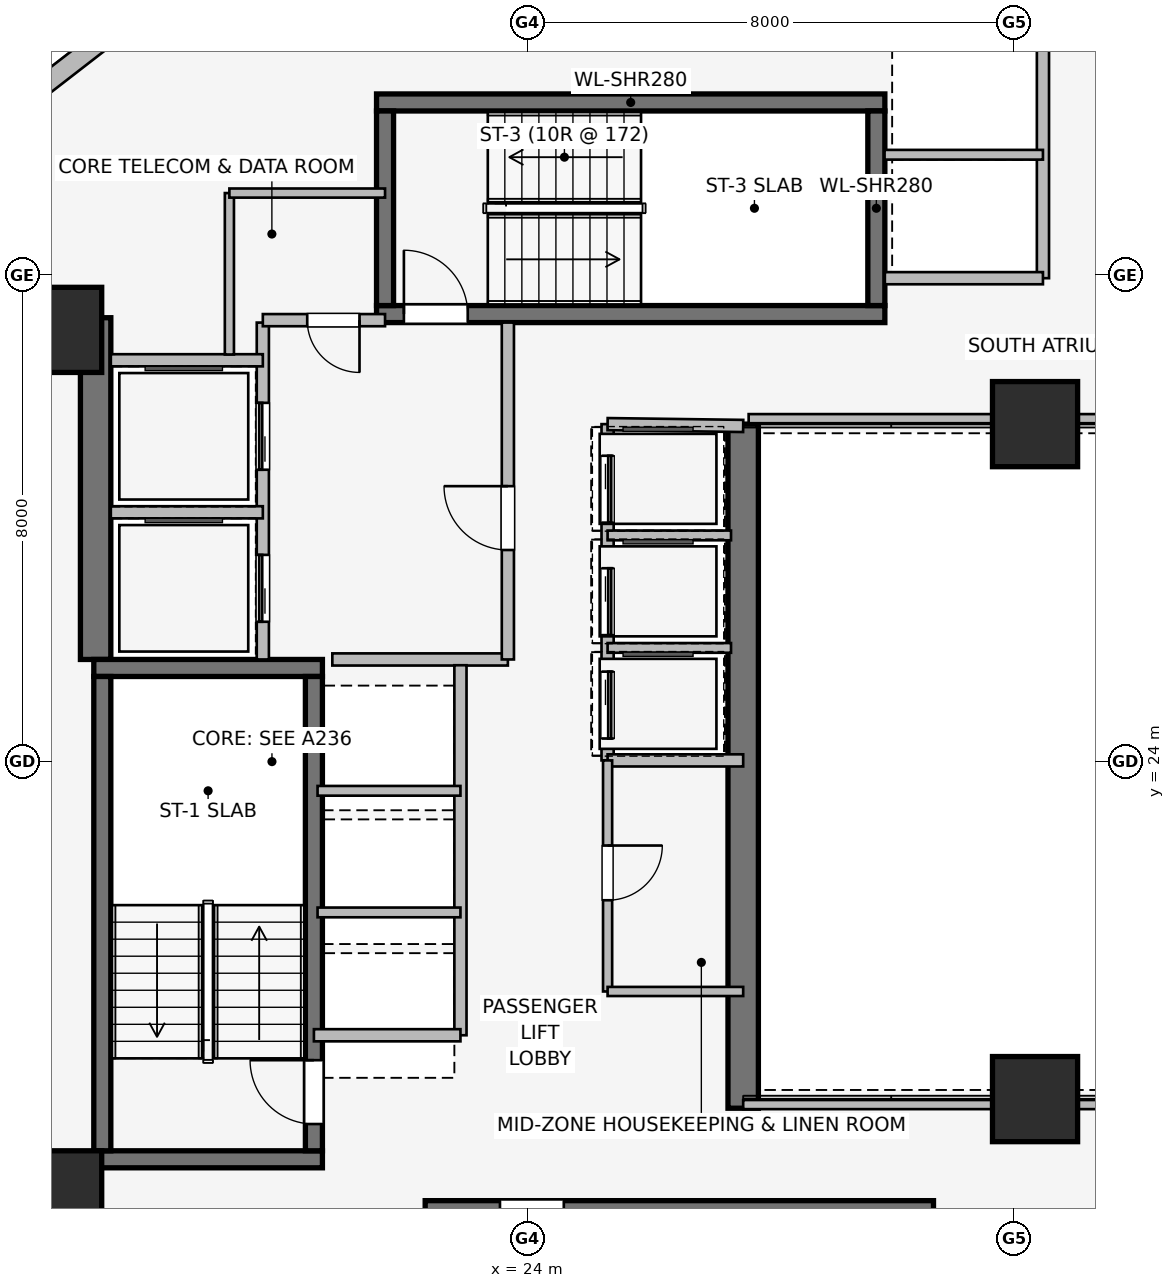
"""IFC4 building model, lengths in metres.
Left out: names, types, materials, properties, quantities, classifications, styles, units other than length and angle.
Written with IfcOpenShell. Run it as: python <this file> out.ifc"""

import sys

from ifc_helpers import new_model, si_unit, direction, frame, frame_2d, origin, origin_2d, place, context, subcontext, project, spatial, rectangle, extrude, element, fill, save


model = new_model("IFC4")
c1 = context("Model", 3, precision=1e-05, world=origin(), true_north=direction((0.0, 1.0)))
c2 = subcontext(c1, "Body", "Model", "MODEL_VIEW")
j1 = project(units=[si_unit("LENGTHUNIT", "METRE"), si_unit("PLANEANGLEUNIT", "RADIAN")], contexts=[c1])
p1 = place(None, origin())
s1 = spatial("IfcSite", under=j1, at=p1, CompositionType="ELEMENT")
p2 = place(p1, origin())
s2 = spatial("IfcBuilding", under=s1, at=p2, CompositionType="ELEMENT")
p3 = place(p2, frame((0.0, 0.0, 129.15)))
s3 = spatial("IfcBuildingStorey", under=s2, at=p3, CompositionType="ELEMENT", Elevation=129.15)
p4 = place(p3, frame((16.9, 25.68, 0.0), z_axis=(0.0, 0.0, 1.0), x_axis=(0.0, 1.0, 0.0)))
e1 = element("IfcWall", 1, at=p4, inside=s3, PredefinedType="SHEAR", context=c2, shape_type="SweptSolid", body=[
    extrude(rectangle(XDim=5.62, YDim=0.5, at=frame_2d((2.81, 0.0))), origin(), (0.0, 0.0, 1.0), 3.45),
])
p5 = place(p3, frame((27.55, 29.55, 0.0), z_axis=(0.0, 0.0, 1.0), x_axis=(0.0, -1.0, 0.0)))
e2 = element("IfcWall", 2, at=p5, inside=s3, PredefinedType="SHEAR", context=c2, shape_type="SweptSolid", body=[
    extrude(rectangle(XDim=11.25, YDim=0.5, at=frame_2d((5.625, 0.0))), origin(), (0.0, 0.0, 1.0), 3.45),
])
for number, where, z_axis, x_axis in (
    (3, (16.87, 17.46, 0.0), (0.0, 0.0, 1.0), (1.0, 0.0, 0.0)),
    (4, (20.63, 25.54, 0.0), (0.0, 0.0, 1.0), (-1.0, 0.0, 0.0)),
):
    element("IfcWall", number, at=place(p3, frame(where, z_axis=z_axis, x_axis=x_axis)), inside=s3, PredefinedType="SHEAR", context=c2, shape_type="SweptSolid", body=[
        extrude(rectangle(XDim=3.76, YDim=0.28, at=frame_2d((1.88, 0.0))), origin(), (0.0, 0.0, 1.0), 3.45),
    ])
p6 = place(p3, frame((17.01, 25.4, 0.0), z_axis=(0.0, 0.0, 1.0), x_axis=(0.0, -1.0, 0.0)))
e5 = element("IfcWall", 5, at=p6, inside=s3, PredefinedType="SHEAR", context=c2, shape_type="SweptSolid", body=[
    extrude(rectangle(XDim=7.8, YDim=0.28, at=frame_2d((3.9, 0.0))), origin(), (0.0, 0.0, 1.0), 3.45),
])
p7 = place(p3, frame((20.49, 17.6, 0.0), z_axis=(0.0, 0.0, 1.0), x_axis=(0.0, 1.0, 0.0)))
e6 = element("IfcWall", 6, at=p7, inside=s3, PredefinedType="SHEAR", context=c2, shape_type="SweptSolid", body=[
    extrude(rectangle(XDim=7.8, YDim=0.28, at=frame_2d((3.9, 0.0))), origin(), (0.0, 0.0, 1.0), 3.45),
])
p8 = place(p7, frame((0.44, 0.0, 0.0)))
e7 = element("IfcOpeningElement", 7, at=p8, cuts=e6, PredefinedType="OPENING", context=c2, shape_type="SweptSolid", body=[
    extrude(rectangle(XDim=1.05, YDim=2.0, at=frame_2d((0.525, 1.0))), frame((0.0, 0.15, 0.0), z_axis=(0.0, -1.0, 0.0), x_axis=(1.0, 0.0, 0.0)), (0.0, 0.0, 1.0), 0.3),
])
p9 = place(p3, frame((30.68, 16.64, 0.0), z_axis=(0.0, 0.0, 1.0), x_axis=(-1.0, 0.0, 0.0)))
e8 = element("IfcWall", 8, at=p9, inside=s3, PredefinedType="SHEAR", context=c2, shape_type="SweptSolid", body=[
    extrude(rectangle(XDim=8.36, YDim=0.28, at=frame_2d((4.18, 0.0))), origin(), (0.0, 0.0, 1.0), 3.45),
])
p10 = place(p9, frame((6.08, 0.0, 0.0)))
e9 = element("IfcOpeningElement", 9, at=p10, cuts=e8, PredefinedType="OPENING", context=c2, shape_type="SweptSolid", body=[
    extrude(rectangle(XDim=1.05, YDim=2.0, at=frame_2d((0.525, 1.0))), frame((0.0, 0.15, 0.0), z_axis=(0.0, -1.0, 0.0), x_axis=(1.0, 0.0, 0.0)), (0.0, 0.0, 1.0), 0.3),
])
p11 = place(p3, frame((21.52, 31.36, 0.0), z_axis=(0.0, 0.0, 1.0), x_axis=(1.0, 0.0, 0.0)))
e10 = element("IfcWall", 10, at=p11, inside=s3, PredefinedType="SHEAR", context=c2, shape_type="SweptSolid", body=[
    extrude(rectangle(XDim=8.36, YDim=0.28, at=frame_2d((4.18, 0.0))), origin(), (0.0, 0.0, 1.0), 3.45),
])
p12 = place(p11, frame((0.45, 0.0, 0.0)))
e11 = element("IfcOpeningElement", 11, at=p12, cuts=e10, PredefinedType="OPENING", context=c2, shape_type="SweptSolid", body=[
    extrude(rectangle(XDim=1.05, YDim=2.0, at=frame_2d((0.525, 1.0))), frame((0.0, 0.15, 0.0), z_axis=(0.0, -1.0, 0.0), x_axis=(1.0, 0.0, 0.0)), (0.0, 0.0, 1.0), 0.3),
])
p13 = place(p3, frame((29.88, 34.84, 0.0), z_axis=(0.0, 0.0, 1.0), x_axis=(-1.0, 0.0, 0.0)))
e12 = element("IfcWall", 12, at=p13, inside=s3, PredefinedType="SHEAR", context=c2, shape_type="SweptSolid", body=[
    extrude(rectangle(XDim=8.36, YDim=0.28, at=frame_2d((4.18, 0.0))), origin(), (0.0, 0.0, 1.0), 3.45),
])
for number, where, z_axis, x_axis in (
    (13, (21.66, 34.7, 0.0), (0.0, 0.0, 1.0), (0.0, -1.0, 0.0)),
    (14, (29.74, 31.5, 0.0), (0.0, 0.0, 1.0), (0.0, 1.0, 0.0)),
):
    element("IfcWall", number, at=place(p3, frame(where, z_axis=z_axis, x_axis=x_axis)), inside=s3, PredefinedType="SHEAR", context=c2, shape_type="SweptSolid", body=[
        extrude(rectangle(XDim=3.2, YDim=0.28, at=frame_2d((1.6, 0.0))), origin(), (0.0, 0.0, 1.0), 3.45),
    ])
for number, where, z_axis, x_axis in (
    (15, (16.3, 16.9, 0.0), (0.0, 0.0, 1.0), (1.0, 0.0, 0.0)),
    (16, (16.3, 31.1, 0.0), (0.0, 0.0, 1.0), (1.0, 0.0, 0.0)),
    (17, (32.35, 18.45, 0.0), (0.0, 0.0, 1.0), (1.0, 0.0, 0.0)),
    (18, (32.35, 29.55, 0.0), (0.0, 0.0, 1.0), (1.0, 0.0, 0.0)),
):
    element("IfcColumn", number, at=place(p3, frame(where, z_axis=z_axis, x_axis=x_axis)), inside=s3, PredefinedType="COLUMN", context=c2, shape_type="SweptSolid", body=[
        extrude(rectangle(XDim=1.4, YDim=1.4, at=origin_2d()), origin(), (0.0, 0.0, 1.0), 3.45),
    ])
p14 = place(p3, frame((15.918, 35.024, 0.0), z_axis=(0.0, 0.0, 1.0), x_axis=(0.790621329885, 0.612305408053, 0.0)))
e19 = element("IfcWall", 19, at=p14, inside=s3, PredefinedType="STANDARD", context=c2, shape_type="SweptSolid", body=[
    extrude(rectangle(XDim=1.676, YDim=0.33, at=frame_2d((0.838, 0.0))), origin(), (0.0, 0.0, 1.0), 3.19),
])
p15 = place(p3, frame((19.65, 25.68, 0.0), z_axis=(0.0, 0.0, 1.0), x_axis=(0.0, 1.0, 0.0)))
e20 = element("IfcWall", 20, at=p15, inside=s3, PredefinedType="PARTITIONING", context=c2, shape_type="SweptSolid", body=[
    extrude(rectangle(XDim=5.54, YDim=0.2, at=frame_2d((2.77, 0.0))), origin(), (0.0, 0.0, 1.0), 3.19),
])
p16 = place(p15, frame((0.62, 0.0, 0.0)))
e21 = element("IfcOpeningElement", 21, at=p16, cuts=e20, PredefinedType="OPENING", context=c2, shape_type="SweptSolid", body=[
    extrude(rectangle(XDim=1.1, YDim=2.2, at=frame_2d((0.55, 1.1))), frame((0.0, 0.11, 0.0), z_axis=(0.0, -1.0, 0.0), x_axis=(1.0, 0.0, 0.0)), (0.0, 0.0, 1.0), 0.22),
])
p17 = place(p15, frame((3.12, 0.0, 0.0)))
e22 = element("IfcOpeningElement", 22, at=p17, cuts=e20, PredefinedType="OPENING", context=c2, shape_type="SweptSolid", body=[
    extrude(rectangle(XDim=1.1, YDim=2.2, at=frame_2d((0.55, 1.1))), frame((0.0, 0.11, 0.0), z_axis=(0.0, -1.0, 0.0), x_axis=(1.0, 0.0, 0.0)), (0.0, 0.0, 1.0), 0.22),
])
p18 = place(p3, frame((20.793, 25.68, 0.0), z_axis=(0.0, 0.0, 1.0), x_axis=(1.0, 0.0, 0.0)))
e23 = element("IfcWall", 23, at=p18, inside=s3, PredefinedType="PARTITIONING", context=c2, shape_type="SweptSolid", body=[
    extrude(rectangle(XDim=2.887, YDim=0.2, at=frame_2d((1.443, 0.0))), origin(), (0.0, 0.0, 1.0), 3.19),
])
p19 = place(p3, frame((23.68, 25.68, 0.0), z_axis=(0.0, 0.0, 1.0), x_axis=(0.0, 1.0, 0.0)))
e24 = element("IfcWall", 24, at=p19, inside=s3, PredefinedType="PARTITIONING", context=c2, shape_type="SweptSolid", body=[
    extrude(rectangle(XDim=5.54, YDim=0.2, at=frame_2d((2.77, 0.0))), origin(), (0.0, 0.0, 1.0), 3.19),
])
p20 = place(p19, frame((1.8, 0.0, 0.0)))
e25 = element("IfcOpeningElement", 25, at=p20, cuts=e24, PredefinedType="OPENING", context=c2, shape_type="SweptSolid", body=[
    extrude(rectangle(XDim=1.05, YDim=2.0, at=frame_2d((0.525, 1.0))), frame((0.0, 0.11, 0.0), z_axis=(0.0, -1.0, 0.0), x_axis=(1.0, 0.0, 0.0)), (0.0, 0.0, 1.0), 0.22),
])
p21 = place(p3, frame((21.66, 31.26, 0.0), z_axis=(0.0, 0.0, 1.0), x_axis=(-1.0, 0.0, 0.0)))
e26 = element("IfcWall", 26, at=p21, inside=s3, PredefinedType="PARTITIONING", context=c2, shape_type="SweptSolid", body=[
    extrude(rectangle(XDim=2.01, YDim=0.2, at=frame_2d((1.005, 0.0))), origin(), (0.0, 0.0, 1.0), 3.19),
])
p22 = place(p21, frame((0.42, 0.0, 0.0)))
e27 = element("IfcOpeningElement", 27, at=p22, cuts=e26, PredefinedType="OPENING", context=c2, shape_type="SweptSolid", body=[
    extrude(rectangle(XDim=0.86, YDim=2.0, at=frame_2d((0.43, 1.0))), frame((0.0, 0.11, 0.0), z_axis=(0.0, -1.0, 0.0), x_axis=(1.0, 0.0, 0.0)), (0.0, 0.0, 1.0), 0.22),
])
p23 = place(p3, frame((17.15, 28.1, 0.0), z_axis=(0.0, 0.0, 1.0), x_axis=(1.0, 0.0, 0.0)))
e28 = element("IfcWall", 28, at=p23, inside=s3, PredefinedType="PARTITIONING", context=c2, shape_type="SweptSolid", body=[
    extrude(rectangle(XDim=2.5, YDim=0.2, at=frame_2d((1.25, 0.0))), origin(), (0.0, 0.0, 1.0), 3.19),
])
p24 = place(p3, frame((19.65, 30.6, 0.0), z_axis=(0.0, 0.0, 1.0), x_axis=(-1.0, 0.0, 0.0)))
e29 = element("IfcWall", 29, at=p24, inside=s3, PredefinedType="PARTITIONING", context=c2, shape_type="SweptSolid", body=[
    extrude(rectangle(XDim=2.5, YDim=0.2, at=frame_2d((1.25, 0.0))), origin(), (0.0, 0.0, 1.0), 2.09),
])
p25 = place(p3, frame((32.48, 31.95, 0.0), z_axis=(0.0, 0.0, 1.0), x_axis=(0.0, 1.0, 0.0)))
e30 = element("IfcWall", 30, at=p25, inside=s3, PredefinedType="PARTITIONING", context=c2, shape_type="SweptSolid", body=[
    extrude(rectangle(XDim=4.05, YDim=0.2, at=frame_2d((2.025, 0.0))), origin(), (0.0, 0.0, 1.0), 3.19),
])
p26 = place(p3, frame((32.48, 31.95, 0.0), z_axis=(0.0, 0.0, 1.0), x_axis=(-1.0, 0.0, 0.0)))
e31 = element("IfcWall", 31, at=p26, inside=s3, PredefinedType="PARTITIONING", context=c2, shape_type="SweptSolid", body=[
    extrude(rectangle(XDim=2.6, YDim=0.2, at=frame_2d((1.3, 0.0))), origin(), (0.0, 0.0, 1.0), 3.19),
])
p27 = place(p3, frame((29.875, 33.98, 0.0), z_axis=(0.0, 0.0, 1.0), x_axis=(1.0, 0.0, 0.0)))
e32 = element("IfcWall", 32, at=p27, inside=s3, PredefinedType="PARTITIONING", context=c2, shape_type="SweptSolid", body=[
    extrude(rectangle(XDim=2.605, YDim=0.16, at=frame_2d((1.302, 0.0))), origin(), (0.0, 0.0, 1.0), 3.19),
])
p28 = place(p3, frame((22.9, 19.5, 0.0), z_axis=(0.0, 0.0, 1.0), x_axis=(0.0, 1.0, 0.0)))
e33 = element("IfcWall", 33, at=p28, inside=s3, PredefinedType="PARTITIONING", context=c2, shape_type="SweptSolid", body=[
    extrude(rectangle(XDim=6.085, YDim=0.2, at=frame_2d((3.042, 0.0))), origin(), (0.0, 0.0, 1.0), 3.19),
])
p29 = place(p3, frame((20.49, 19.5, 0.0), z_axis=(0.0, 0.0, 1.0), x_axis=(1.0, 0.0, 0.0)))
e34 = element("IfcWall", 34, at=p29, inside=s3, PredefinedType="PARTITIONING", context=c2, shape_type="SweptSolid", body=[
    extrude(rectangle(XDim=2.41, YDim=0.2, at=frame_2d((1.205, 0.0))), origin(), (0.0, 0.0, 1.0), 2.09),
])
for number, where, z_axis, x_axis in (
    (35, (20.55, 21.52, 0.0), (0.0, 0.0, 1.0), (1.0, 0.0, 0.0)),
    (36, (20.55, 23.52, 0.0), (0.0, 0.0, 1.0), (1.0, 0.0, 0.0)),
):
    element("IfcWall", number, at=place(p3, frame(where, z_axis=z_axis, x_axis=x_axis)), inside=s3, PredefinedType="PARTITIONING", context=c2, shape_type="SweptSolid", body=[
        extrude(rectangle(XDim=2.35, YDim=0.16, at=frame_2d((1.175, 0.0))), origin(), (0.0, 0.0, 1.0), 3.19),
    ])
p30 = place(p3, frame((25.32, 29.55, 0.0), z_axis=(0.0, 0.0, 1.0), x_axis=(0.0, -1.0, 0.0)))
e37 = element("IfcWall", 37, at=p30, inside=s3, PredefinedType="PARTITIONING", context=c2, shape_type="SweptSolid", body=[
    extrude(rectangle(XDim=5.53, YDim=0.2, at=frame_2d((2.765, 0.0))), origin(), (0.0, 0.0, 1.0), 3.19),
])
p31 = place(p30, frame((0.52, 0.0, 0.0)))
e38 = element("IfcOpeningElement", 38, at=p31, cuts=e37, PredefinedType="OPENING", context=c2, shape_type="SweptSolid", body=[
    extrude(rectangle(XDim=1.1, YDim=2.2, at=frame_2d((0.55, 1.1))), frame((0.0, 0.11, 0.0), z_axis=(0.0, -1.0, 0.0), x_axis=(1.0, 0.0, 0.0)), (0.0, 0.0, 1.0), 0.22),
])
p32 = place(p30, frame((2.37, 0.0, 0.0)))
e39 = element("IfcOpeningElement", 39, at=p32, cuts=e37, PredefinedType="OPENING", context=c2, shape_type="SweptSolid", body=[
    extrude(rectangle(XDim=1.1, YDim=2.2, at=frame_2d((0.55, 1.1))), frame((0.0, 0.11, 0.0), z_axis=(0.0, -1.0, 0.0), x_axis=(1.0, 0.0, 0.0)), (0.0, 0.0, 1.0), 0.22),
])
p33 = place(p30, frame((4.07, 0.0, 0.0)))
e40 = element("IfcOpeningElement", 40, at=p33, cuts=e37, PredefinedType="OPENING", context=c2, shape_type="SweptSolid", body=[
    extrude(rectangle(XDim=1.1, YDim=2.2, at=frame_2d((0.55, 1.1))), frame((0.0, 0.11, 0.0), z_axis=(0.0, -1.0, 0.0), x_axis=(1.0, 0.0, 0.0)), (0.0, 0.0, 1.0), 0.22),
])
p34 = place(p3, frame((27.55, 29.52, 0.0), z_axis=(0.0, 0.0, 1.0), x_axis=(-0.999909343457, 0.013464949556, 0.0)))
e41 = element("IfcWall", 41, at=p34, inside=s3, PredefinedType="PARTITIONING", context=c2, shape_type="SweptSolid", body=[
    extrude(rectangle(XDim=2.23, YDim=0.2, at=frame_2d((1.115, 0.0))), origin(), (0.0, 0.0, 1.0), 2.09),
])
p35 = place(p3, frame((25.32, 24.02, 0.0), z_axis=(0.0, 0.0, 1.0), x_axis=(1.0, 0.0, 0.0)))
e42 = element("IfcWall", 42, at=p35, inside=s3, PredefinedType="PARTITIONING", context=c2, shape_type="SweptSolid", body=[
    extrude(rectangle(XDim=2.23, YDim=0.2, at=frame_2d((1.115, 0.0))), origin(), (0.0, 0.0, 1.0), 3.19),
])
for number, where, z_axis, x_axis in (
    (43, (25.32, 25.87, 0.0), (0.0, 0.0, 1.0), (1.0, 0.0, 0.0)),
    (44, (25.32, 27.72, 0.0), (0.0, 0.0, 1.0), (1.0, 0.0, 0.0)),
):
    element("IfcWall", number, at=place(p3, frame(where, z_axis=z_axis, x_axis=x_axis)), inside=s3, PredefinedType="PARTITIONING", context=c2, shape_type="SweptSolid", body=[
        extrude(rectangle(XDim=2.03, YDim=0.16, at=frame_2d((1.015, 0.0))), origin(), (0.0, 0.0, 1.0), 3.19),
    ])
p36 = place(p3, frame((25.32, 24.02, 0.0), z_axis=(0.0, 0.0, 1.0), x_axis=(0.0, -1.0, 0.0)))
e45 = element("IfcWall", 45, at=p36, inside=s3, PredefinedType="PARTITIONING", context=c2, shape_type="SweptSolid", body=[
    extrude(rectangle(XDim=3.8, YDim=0.15, at=frame_2d((1.9, 0.0))), origin(), (0.0, 0.0, 1.0), 3.19),
])
p37 = place(p36, frame((1.4, 0.0, 0.0)))
e46 = element("IfcOpeningElement", 46, at=p37, cuts=e45, PredefinedType="OPENING", context=c2, shape_type="SweptSolid", body=[
    extrude(rectangle(XDim=0.9, YDim=2.0, at=frame_2d((0.45, 1.0))), frame((0.0, 0.085, 0.0), z_axis=(0.0, -1.0, 0.0), x_axis=(1.0, 0.0, 0.0)), (0.0, 0.0, 1.0), 0.17),
])
p38 = place(p3, frame((25.32, 20.22, 0.0), z_axis=(0.0, 0.0, 1.0), x_axis=(1.0, 0.0, 0.0)))
e47 = element("IfcWall", 47, at=p38, inside=s3, PredefinedType="PARTITIONING", context=c2, shape_type="SweptSolid", body=[
    extrude(rectangle(XDim=2.23, YDim=0.15, at=frame_2d((1.115, 0.0))), origin(), (0.0, 0.0, 1.0), 3.19),
])
p39 = place(p3, frame((19.1, 33.35, 0.0), z_axis=(0.0, 0.0, 1.0), x_axis=(0.0, -1.0, 0.0)))
e48 = element("IfcWall", 48, at=p39, inside=s3, PredefinedType="PARTITIONING", context=c2, shape_type="SweptSolid", body=[
    extrude(rectangle(XDim=2.655, YDim=0.15, at=frame_2d((1.328, 0.0))), origin(), (0.0, 0.0, 1.0), 2.42),
])
p40 = place(p3, frame((21.66, 33.35, 0.0), z_axis=(0.0, 0.0, 1.0), x_axis=(-1.0, 0.0, 0.0)))
e49 = element("IfcWall", 49, at=p40, inside=s3, PredefinedType="PARTITIONING", context=c2, shape_type="SweptSolid", body=[
    extrude(rectangle(XDim=2.56, YDim=0.15, at=frame_2d((1.28, 0.0))), origin(), (0.0, 0.0, 1.0), 3.19),
])
p41 = place(p3, frame((27.55, 18.36, 0.0), z_axis=(0.0, 0.0, 1.0), x_axis=(1.0, 0.0, 0.0)))
e50 = element("IfcWall", 50, at=p41, inside=s3, PredefinedType="PARTITIONING", context=c2, shape_type="SweptSolid", body=[
    extrude(rectangle(XDim=12.29, YDim=0.15, at=frame_2d((6.145, 0.0))), origin(), (0.0, 0.0, 1.0), 2.331),
])
p42 = place(p3, frame((39.84, 29.64, 0.0), z_axis=(0.0, 0.0, 1.0), x_axis=(-1.0, 0.0, 0.0)))
e51 = element("IfcWall", 51, at=p42, inside=s3, PredefinedType="PARTITIONING", context=c2, shape_type="SweptSolid", body=[
    extrude(rectangle(XDim=12.2, YDim=0.15, at=frame_2d((6.1, 0.0))), origin(), (0.0, 0.0, 1.0), 2.331),
])
p43 = place(p8, origin())
e52 = element("IfcDoor", 52, at=p43, inside=s3, OperationType="SINGLE_SWING_RIGHT", PredefinedType="DOOR", context=c2, shape_type="SweptSolid", body=[
    extrude(rectangle(XDim=1.05, YDim=2.0, at=frame_2d((0.525, 1.0))), frame((0.0, 0.025, 0.0), z_axis=(0.0, -1.0, 0.0), x_axis=(1.0, 0.0, 0.0)), (0.0, 0.0, 1.0), 0.05),
])
fill(e7, e52)
p44 = place(p10, origin())
e53 = element("IfcDoor", 53, at=p44, inside=s3, OperationType="SINGLE_SWING_RIGHT", PredefinedType="DOOR", context=c2, shape_type="SweptSolid", body=[
    extrude(rectangle(XDim=1.05, YDim=2.0, at=frame_2d((0.525, 1.0))), frame((0.0, 0.025, 0.0), z_axis=(0.0, -1.0, 0.0), x_axis=(1.0, 0.0, 0.0)), (0.0, 0.0, 1.0), 0.05),
])
fill(e9, e53)
p45 = place(p12, origin())
e54 = element("IfcDoor", 54, at=p45, inside=s3, OperationType="SINGLE_SWING_LEFT", PredefinedType="DOOR", context=c2, shape_type="SweptSolid", body=[
    extrude(rectangle(XDim=1.05, YDim=2.0, at=frame_2d((0.525, 1.0))), frame((0.0, 0.025, 0.0), z_axis=(0.0, -1.0, 0.0), x_axis=(1.0, 0.0, 0.0)), (0.0, 0.0, 1.0), 0.05),
])
fill(e11, e54)
p46 = place(p16, origin())
e55 = element("IfcDoor", 55, at=p46, inside=s3, OperationType="SLIDING_TO_LEFT", PredefinedType="DOOR", context=c2, shape_type="SweptSolid", body=[
    extrude(rectangle(XDim=1.1, YDim=2.2, at=frame_2d((0.55, 1.1))), frame((0.0, 0.025, 0.0), z_axis=(0.0, -1.0, 0.0), x_axis=(1.0, 0.0, 0.0)), (0.0, 0.0, 1.0), 0.05),
])
fill(e21, e55)
p47 = place(p17, origin())
e56 = element("IfcDoor", 56, at=p47, inside=s3, OperationType="SLIDING_TO_LEFT", PredefinedType="DOOR", context=c2, shape_type="SweptSolid", body=[
    extrude(rectangle(XDim=1.1, YDim=2.2, at=frame_2d((0.55, 1.1))), frame((0.0, 0.025, 0.0), z_axis=(0.0, -1.0, 0.0), x_axis=(1.0, 0.0, 0.0)), (0.0, 0.0, 1.0), 0.05),
])
fill(e22, e56)
p48 = place(p20, origin())
e57 = element("IfcDoor", 57, at=p48, inside=s3, OperationType="SINGLE_SWING_RIGHT", PredefinedType="DOOR", context=c2, shape_type="SweptSolid", body=[
    extrude(rectangle(XDim=1.05, YDim=2.0, at=frame_2d((0.525, 1.0))), frame((0.0, 0.025, 0.0), z_axis=(0.0, -1.0, 0.0), x_axis=(1.0, 0.0, 0.0)), (0.0, 0.0, 1.0), 0.05),
])
fill(e25, e57)
p49 = place(p22, origin())
e58 = element("IfcDoor", 58, at=p49, inside=s3, OperationType="SINGLE_SWING_LEFT", PredefinedType="DOOR", context=c2, shape_type="SweptSolid", body=[
    extrude(rectangle(XDim=0.86, YDim=2.0, at=frame_2d((0.43, 1.0))), frame((0.0, 0.025, 0.0), z_axis=(0.0, -1.0, 0.0), x_axis=(1.0, 0.0, 0.0)), (0.0, 0.0, 1.0), 0.05),
])
fill(e27, e58)
p50 = place(p31, origin())
e59 = element("IfcDoor", 59, at=p50, inside=s3, OperationType="SLIDING_TO_LEFT", PredefinedType="DOOR", context=c2, shape_type="SweptSolid", body=[
    extrude(rectangle(XDim=1.1, YDim=2.2, at=frame_2d((0.55, 1.1))), frame((0.0, 0.025, 0.0), z_axis=(0.0, -1.0, 0.0), x_axis=(1.0, 0.0, 0.0)), (0.0, 0.0, 1.0), 0.05),
])
fill(e38, e59)
p51 = place(p32, origin())
e60 = element("IfcDoor", 60, at=p51, inside=s3, OperationType="SLIDING_TO_LEFT", PredefinedType="DOOR", context=c2, shape_type="SweptSolid", body=[
    extrude(rectangle(XDim=1.1, YDim=2.2, at=frame_2d((0.55, 1.1))), frame((0.0, 0.025, 0.0), z_axis=(0.0, -1.0, 0.0), x_axis=(1.0, 0.0, 0.0)), (0.0, 0.0, 1.0), 0.05),
])
fill(e39, e60)
p52 = place(p33, origin())
e61 = element("IfcDoor", 61, at=p52, inside=s3, OperationType="SLIDING_TO_LEFT", PredefinedType="DOOR", context=c2, shape_type="SweptSolid", body=[
    extrude(rectangle(XDim=1.1, YDim=2.2, at=frame_2d((0.55, 1.1))), frame((0.0, 0.025, 0.0), z_axis=(0.0, -1.0, 0.0), x_axis=(1.0, 0.0, 0.0)), (0.0, 0.0, 1.0), 0.05),
])
fill(e40, e61)
p53 = place(p37, origin())
e62 = element("IfcDoor", 62, at=p53, inside=s3, OperationType="SINGLE_SWING_LEFT", PredefinedType="DOOR", context=c2, shape_type="SweptSolid", body=[
    extrude(rectangle(XDim=0.9, YDim=2.0, at=frame_2d((0.45, 1.0))), frame((0.0, 0.025, 0.0), z_axis=(0.0, -1.0, 0.0), x_axis=(1.0, 0.0, 0.0)), (0.0, 0.0, 1.0), 0.05),
])
fill(e46, e62)
save(model, sys.argv[1])
